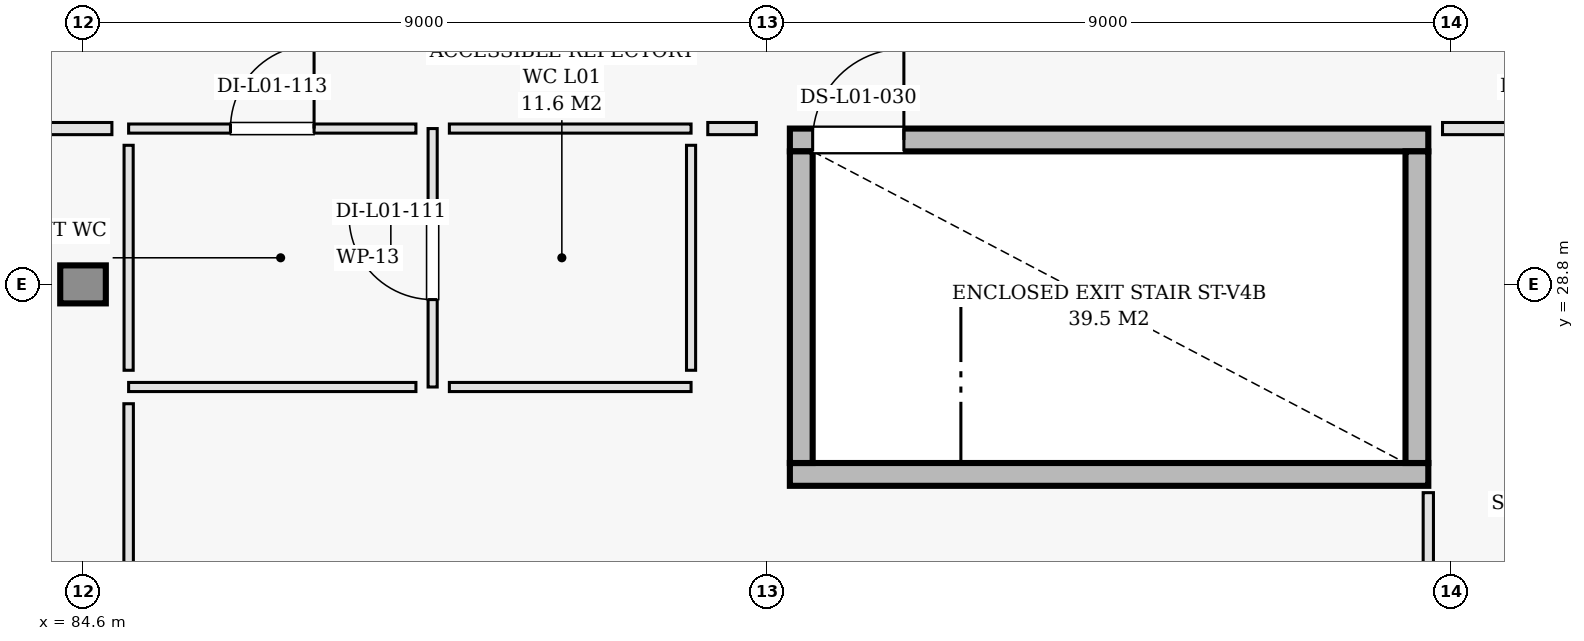
"""IFC4 building model, lengths in metres.
Left out: names, types, materials, properties, quantities, classifications, styles, units other than length and angle.
Written with IfcOpenShell. Run it as: python <this file> out.ifc"""

import sys

from ifc_helpers import new_model, si_unit, direction, frame, frame_2d, origin, origin_2d, place, context, subcontext, project, spatial, rectangle, extrude, element, fill, save


model = new_model("IFC4")
c1 = context("Model", 3, precision=1e-05, world=origin(), true_north=direction((0.0, 1.0)))
c2 = subcontext(c1, "Body", "Model", "MODEL_VIEW")
j1 = project(units=[si_unit("LENGTHUNIT", "METRE"), si_unit("PLANEANGLEUNIT", "RADIAN")], contexts=[c1])
p1 = place(None, origin())
s1 = spatial("IfcSite", under=j1, at=p1, CompositionType="ELEMENT")
p2 = place(p1, origin())
s2 = spatial("IfcBuilding", under=s1, at=p2, CompositionType="ELEMENT")
p3 = place(p2, frame((0.0, 0.0, 4.8)))
s3 = spatial("IfcBuildingStorey", under=s2, at=p3, CompositionType="ELEMENT", Elevation=4.8)
p4 = place(p3, frame((84.6, 28.8, 0.0), z_axis=(0.0, 0.0, 1.0), x_axis=(1.0, 0.0, 0.0)))
e1 = element("IfcColumn", 1, at=p4, inside=s3, PredefinedType="COLUMN", context=c2, shape_type="SweptSolid", body=[
    extrude(rectangle(XDim=0.5, YDim=0.5, at=origin_2d()), origin(), (0.0, 0.0, 1.0), 4.8),
])
p5 = place(p3, frame((93.9, 26.3, 0.0), z_axis=(0.0, 0.0, 1.0), x_axis=(1.0, 0.0, 0.0)))
e2 = element("IfcWall", 2, at=p5, inside=s3, PredefinedType="SHEAR", context=c2, shape_type="SweptSolid", body=[
    extrude(rectangle(XDim=8.4, YDim=0.3, at=frame_2d((4.2, 0.0))), origin(), (0.0, 0.0, 1.0), 4.6),
])
p6 = place(p3, frame((93.9, 30.7, 0.0), z_axis=(0.0, 0.0, 1.0), x_axis=(1.0, 0.0, 0.0)))
e3 = element("IfcWall", 3, at=p6, inside=s3, PredefinedType="SHEAR", context=c2, shape_type="SweptSolid", body=[
    extrude(rectangle(XDim=8.4, YDim=0.3, at=frame_2d((4.2, 0.0))), origin(), (0.0, 0.0, 1.0), 4.6),
])
p7 = place(p6, frame((0.3, 0.0, 0.0)))
e4 = element("IfcOpeningElement", 4, at=p7, cuts=e3, PredefinedType="OPENING", context=c2, shape_type="SweptSolid", body=[
    extrude(rectangle(XDim=1.2, YDim=2.15, at=frame_2d((0.6, 1.075))), frame((0.0, 0.16, 0.0), z_axis=(0.0, -1.0, 0.0), x_axis=(1.0, 0.0, 0.0)), (0.0, 0.0, 1.0), 0.32),
])
for number, where, z_axis, x_axis in (
    (5, (94.05, 26.45, 0.0), (0.0, 0.0, 1.0), (0.0, 1.0, 0.0)),
    (6, (102.15, 26.45, 0.0), (0.0, 0.0, 1.0), (0.0, 1.0, 0.0)),
):
    element("IfcWall", number, at=place(p3, frame(where, z_axis=z_axis, x_axis=x_axis)), inside=s3, PredefinedType="SHEAR", context=c2, shape_type="SweptSolid", body=[
        extrude(rectangle(XDim=4.1, YDim=0.3, at=frame_2d((2.05, 0.0))), origin(), (0.0, 0.0, 1.0), 4.6),
    ])
p8 = place(p3, frame((89.2, 27.45, 0.0), z_axis=(0.0, 0.0, 1.0), x_axis=(0.0, 1.0, 0.0)))
e7 = element("IfcWall", 7, at=p8, inside=s3, PredefinedType="PARTITIONING", context=c2, shape_type="SweptSolid", body=[
    extrude(rectangle(XDim=3.4, YDim=0.12, at=frame_2d((1.7, 0.0))), origin(), (0.0, 0.0, 1.0), 4.48),
])
p9 = place(p8, frame((1.15, 0.0, 0.0)))
e8 = element("IfcOpeningElement", 8, at=p9, cuts=e7, PredefinedType="OPENING", context=c2, shape_type="SweptSolid", body=[
    extrude(rectangle(XDim=1.1, YDim=2.15, at=frame_2d((0.55, 1.075))), frame((0.0, 0.07, 0.0), z_axis=(0.0, -1.0, 0.0), x_axis=(1.0, 0.0, 0.0)), (0.0, 0.0, 1.0), 0.14),
])
for number, where, z_axis, x_axis in (
    (9, (89.42, 27.45, 0.0), (0.0, 0.0, 1.0), (1.0, 0.0, 0.0)),
    (10, (89.42, 30.85, 0.0), (0.0, 0.0, 1.0), (1.0, 0.0, 0.0)),
):
    element("IfcWall", number, at=place(p3, frame(where, z_axis=z_axis, x_axis=x_axis)), inside=s3, PredefinedType="PARTITIONING", context=c2, shape_type="SweptSolid", body=[
        extrude(rectangle(XDim=3.18, YDim=0.12, at=frame_2d((1.59, 0.0))), origin(), (0.0, 0.0, 1.0), 4.48),
    ])
p10 = place(p3, frame((92.6, 27.67, 0.0), z_axis=(0.0, 0.0, 1.0), x_axis=(0.0, 1.0, 0.0)))
e11 = element("IfcWall", 11, at=p10, inside=s3, PredefinedType="PARTITIONING", context=c2, shape_type="SweptSolid", body=[
    extrude(rectangle(XDim=2.96, YDim=0.12, at=frame_2d((1.48, 0.0))), origin(), (0.0, 0.0, 1.0), 4.48),
])
p11 = place(p3, frame((85.2, 30.85, 0.0), z_axis=(0.0, 0.0, 1.0), x_axis=(1.0, 0.0, 0.0)))
e12 = element("IfcWall", 12, at=p11, inside=s3, PredefinedType="PARTITIONING", context=c2, shape_type="SweptSolid", body=[
    extrude(rectangle(XDim=3.78, YDim=0.12, at=frame_2d((1.89, 0.0))), origin(), (0.0, 0.0, 1.0), 4.48),
])
p12 = place(p11, frame((1.34, 0.0, 0.0)))
e13 = element("IfcOpeningElement", 13, at=p12, cuts=e12, PredefinedType="OPENING", context=c2, shape_type="SweptSolid", body=[
    extrude(rectangle(XDim=1.1, YDim=2.15, at=frame_2d((0.55, 1.075))), frame((0.0, 0.07, 0.0), z_axis=(0.0, -1.0, 0.0), x_axis=(1.0, 0.0, 0.0)), (0.0, 0.0, 1.0), 0.14),
])
p13 = place(p3, frame((85.2, 27.45, 0.0), z_axis=(0.0, 0.0, 1.0), x_axis=(1.0, 0.0, 0.0)))
e14 = element("IfcWall", 14, at=p13, inside=s3, PredefinedType="PARTITIONING", context=c2, shape_type="SweptSolid", body=[
    extrude(rectangle(XDim=3.78, YDim=0.12, at=frame_2d((1.89, 0.0))), origin(), (0.0, 0.0, 1.0), 4.48),
])
p14 = place(p3, frame((85.2, 27.67, 0.0), z_axis=(0.0, 0.0, 1.0), x_axis=(0.0, 1.0, 0.0)))
e15 = element("IfcWall", 15, at=p14, inside=s3, PredefinedType="PARTITIONING", context=c2, shape_type="SweptSolid", body=[
    extrude(rectangle(XDim=2.96, YDim=0.12, at=frame_2d((1.48, 0.0))), origin(), (0.0, 0.0, 1.0), 4.48),
])
p15 = place(p3, frame((102.487, 30.85, 0.0), z_axis=(0.0, 0.0, 1.0), x_axis=(1.0, 0.0, 0.0)))
e16 = element("IfcWall", 16, at=p15, inside=s3, PredefinedType="PARTITIONING", context=c2, shape_type="SweptSolid", body=[
    extrude(rectangle(XDim=2.967, YDim=0.16, at=frame_2d((1.483, 0.0))), origin(), (0.0, 0.0, 1.0), 4.48),
])
p16 = place(p15, frame((0.933, 0.0, 0.0)))
e17 = element("IfcOpeningElement", 17, at=p16, cuts=e16, PredefinedType="OPENING", context=c2, shape_type="SweptSolid", body=[
    extrude(rectangle(XDim=1.1, YDim=2.15, at=frame_2d((0.55, 1.075))), frame((0.0, 0.09, 0.0), z_axis=(0.0, -1.0, 0.0), x_axis=(1.0, 0.0, 0.0)), (0.0, 0.0, 1.0), 0.18),
])
p17 = place(p3, frame((102.3, 21.655, 0.0), z_axis=(0.0, 0.0, 1.0), x_axis=(0.0, 1.0, 0.0)))
e18 = element("IfcWall", 18, at=p17, inside=s3, PredefinedType="PARTITIONING", context=c2, shape_type="SweptSolid", body=[
    extrude(rectangle(XDim=4.405, YDim=0.135, at=frame_2d((2.203, 0.0))), origin(), (0.0, 0.0, 1.0), 4.48),
])
p18 = place(p3, frame((71.64, 30.85, 0.0), z_axis=(0.0, 0.0, 1.0), x_axis=(1.0, 0.0, 0.0)))
e19 = element("IfcWall", 19, at=p18, inside=s3, PredefinedType="PARTITIONING", context=c2, shape_type="SweptSolid", body=[
    extrude(rectangle(XDim=13.34, YDim=0.16, at=frame_2d((6.67, 0.0))), origin(), (0.0, 0.0, 1.0), 4.48),
])
p19 = place(p18, frame((6.12, 0.0, 0.0)))
e20 = element("IfcOpeningElement", 20, at=p19, cuts=e19, PredefinedType="OPENING", context=c2, shape_type="SweptSolid", body=[
    extrude(rectangle(XDim=1.1, YDim=2.15, at=frame_2d((0.55, 1.075))), frame((0.0, 0.09, 0.0), z_axis=(0.0, -1.0, 0.0), x_axis=(1.0, 0.0, 0.0)), (0.0, 0.0, 1.0), 0.18),
])
p20 = place(p3, frame((85.2, 21.655, 0.0), z_axis=(0.0, 0.0, 1.0), x_axis=(0.0, 1.0, 0.0)))
e21 = element("IfcWall", 21, at=p20, inside=s3, PredefinedType="PARTITIONING", context=c2, shape_type="SweptSolid", body=[
    extrude(rectangle(XDim=5.575, YDim=0.125, at=frame_2d((2.788, 0.0))), origin(), (0.0, 0.0, 1.0), 4.48),
])
p21 = place(p3, frame((92.82, 30.85, 0.0), z_axis=(0.0, 0.0, 1.0), x_axis=(1.0, 0.0, 0.0)))
e22 = element("IfcWall", 22, at=p21, inside=s3, PredefinedType="PARTITIONING", context=c2, shape_type="SweptSolid", body=[
    extrude(rectangle(XDim=0.639, YDim=0.16, at=frame_2d((0.319, 0.0))), origin(), (0.0, 0.0, 1.0), 4.48),
])
p22 = place(p7, origin())
e23 = element("IfcDoor", 23, at=p22, inside=s3, OperationType="SINGLE_SWING_RIGHT", PredefinedType="DOOR", context=c2, shape_type="SweptSolid", body=[
    extrude(rectangle(XDim=1.2, YDim=2.15, at=frame_2d((0.6, 1.075))), frame((0.0, 0.025, 0.0), z_axis=(0.0, -1.0, 0.0), x_axis=(1.0, 0.0, 0.0)), (0.0, 0.0, 1.0), 0.05),
])
fill(e4, e23)
p23 = place(p9, origin())
e24 = element("IfcDoor", 24, at=p23, inside=s3, OperationType="SINGLE_SWING_RIGHT", PredefinedType="DOOR", context=c2, shape_type="SweptSolid", body=[
    extrude(rectangle(XDim=1.1, YDim=2.15, at=frame_2d((0.55, 1.075))), frame((0.0, 0.025, 0.0), z_axis=(0.0, -1.0, 0.0), x_axis=(1.0, 0.0, 0.0)), (0.0, 0.0, 1.0), 0.05),
])
fill(e8, e24)
p24 = place(p12, origin())
e25 = element("IfcDoor", 25, at=p24, inside=s3, OperationType="SINGLE_SWING_RIGHT", PredefinedType="DOOR", context=c2, shape_type="SweptSolid", body=[
    extrude(rectangle(XDim=1.1, YDim=2.15, at=frame_2d((0.55, 1.075))), frame((0.0, 0.025, 0.0), z_axis=(0.0, -1.0, 0.0), x_axis=(1.0, 0.0, 0.0)), (0.0, 0.0, 1.0), 0.05),
])
fill(e13, e25)
save(model, sys.argv[1])
